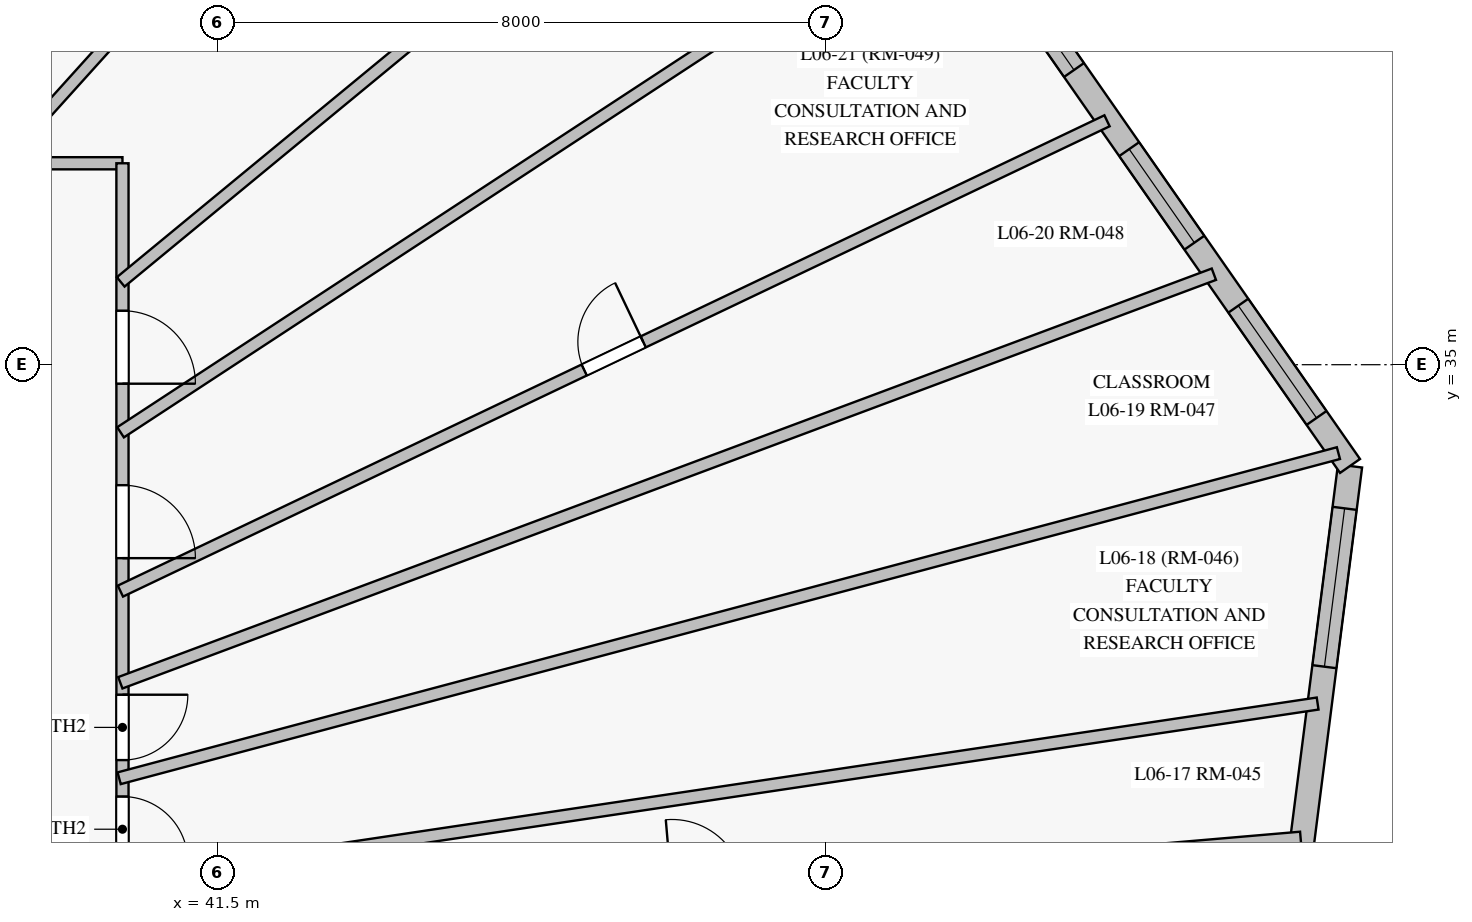
"""IFC4 building model, lengths in metres.
Left out: names, types, materials, properties, quantities, classifications, styles, units other than length and angle.
Written with IfcOpenShell. Run it as: python <this file> out.ifc"""

import sys

from ifc_helpers import new_model, si_unit, direction, frame, frame_2d, origin, origin_with_axes, place, context, subcontext, project, spatial, rectangle, extrude, source, transform, mapped, element, fill, save


model = new_model("IFC4")
c1 = context("Model", 3, precision=1e-05, world=origin(), true_north=direction((0.0, 1.0)))
c2 = subcontext(c1, "Body", "Model", "MODEL_VIEW")
j1 = project(units=[si_unit("LENGTHUNIT", "METRE"), si_unit("PLANEANGLEUNIT", "RADIAN")], contexts=[c1])
p1 = place(None, origin())
s1 = spatial("IfcSite", under=j1, at=p1, CompositionType="ELEMENT")
p2 = place(p1, origin())
s2 = spatial("IfcBuilding", under=s1, at=p2, CompositionType="ELEMENT")
p3 = place(p2, frame((0.0, 0.0, 26.5)))
s3 = spatial("IfcBuildingStorey", under=s2, at=p3, CompositionType="ELEMENT", Elevation=26.5)
p4 = place(p3, frame((55.03, 22.925, 0.0), z_axis=(0.0, 0.0, 1.0), x_axis=(0.126495485641, 0.991967182982, 0.0)))
e1 = element("IfcWall", 1, at=p4, inside=s3, PredefinedType="SOLIDWALL", context=c2, shape_type="SweptSolid", body=[
    extrude(rectangle(XDim=10.829, YDim=0.32, at=frame_2d((5.415, 0.0))), origin(), (0.0, 0.0, 1.0), 3.35),
])
p5 = place(p4, frame((0.58, 0.0, 0.85)))
e2 = element("IfcOpeningElement", 2, at=p5, cuts=e1, PredefinedType="OPENING", context=c2, shape_type="SweptSolid", body=[
    extrude(rectangle(XDim=1.5, YDim=1.85, at=frame_2d((0.75, 0.925))), frame((0.0, 0.17, 0.0), z_axis=(0.0, -1.0, 0.0), x_axis=(1.0, 0.0, 0.0)), (0.0, 0.0, 1.0), 0.34),
])
p6 = place(p4, frame((3.194, 0.0, 0.85)))
e3 = element("IfcOpeningElement", 3, at=p6, cuts=e1, PredefinedType="OPENING", context=c2, shape_type="SweptSolid", body=[
    extrude(rectangle(XDim=2.1, YDim=1.95, at=frame_2d((1.05, 0.975))), frame((0.0, 0.17, 0.0), z_axis=(0.0, -1.0, 0.0), x_axis=(1.0, 0.0, 0.0)), (0.0, 0.0, 1.0), 0.34),
])
p7 = place(p4, frame((8.167, 0.0, 0.85)))
e4 = element("IfcOpeningElement", 4, at=p7, cuts=e1, PredefinedType="OPENING", context=c2, shape_type="SweptSolid", body=[
    extrude(rectangle(XDim=2.1, YDim=1.95, at=frame_2d((1.05, 0.975))), frame((0.0, 0.17, 0.0), z_axis=(0.0, -1.0, 0.0), x_axis=(1.0, 0.0, 0.0)), (0.0, 0.0, 1.0), 0.34),
])
p8 = place(p3, frame((56.4, 33.668, 0.0), z_axis=(0.0, 0.0, 1.0), x_axis=(-0.571842194633, 0.820363641586, 0.0)))
e5 = element("IfcWall", 5, at=p8, inside=s3, PredefinedType="SOLIDWALL", context=c2, shape_type="SweptSolid", body=[
    extrude(rectangle(XDim=13.47, YDim=0.32, at=frame_2d((6.735, 0.0))), origin(), (0.0, 0.0, 1.0), 3.35),
])
p9 = place(p8, frame((0.77, 0.0, 0.85)))
e6 = element("IfcOpeningElement", 6, at=p9, cuts=e5, PredefinedType="OPENING", context=c2, shape_type="SweptSolid", body=[
    extrude(rectangle(XDim=1.8, YDim=1.85, at=frame_2d((0.9, 0.925))), frame((0.0, 0.17, 0.0), z_axis=(0.0, -1.0, 0.0), x_axis=(1.0, 0.0, 0.0)), (0.0, 0.0, 1.0), 0.34),
])
p10 = place(p8, frame((3.581, 0.0, 0.85)))
e7 = element("IfcOpeningElement", 7, at=p10, cuts=e5, PredefinedType="OPENING", context=c2, shape_type="SweptSolid", body=[
    extrude(rectangle(XDim=1.5, YDim=1.85, at=frame_2d((0.75, 0.925))), frame((0.0, 0.17, 0.0), z_axis=(0.0, -1.0, 0.0), x_axis=(1.0, 0.0, 0.0)), (0.0, 0.0, 1.0), 0.34),
])
p11 = place(p8, frame((6.35, 0.0, 0.85)))
e8 = element("IfcOpeningElement", 8, at=p11, cuts=e5, PredefinedType="OPENING", context=c2, shape_type="SweptSolid", body=[
    extrude(rectangle(XDim=2.1, YDim=1.95, at=frame_2d((1.05, 0.975))), frame((0.0, 0.17, 0.0), z_axis=(0.0, -1.0, 0.0), x_axis=(1.0, 0.0, 0.0)), (0.0, 0.0, 1.0), 0.34),
])
p12 = place(p8, frame((9.816, 0.0, 0.85)))
e9 = element("IfcOpeningElement", 9, at=p12, cuts=e5, PredefinedType="OPENING", context=c2, shape_type="SweptSolid", body=[
    extrude(rectangle(XDim=1.8, YDim=1.85, at=frame_2d((0.9, 0.925))), frame((0.0, 0.17, 0.0), z_axis=(0.0, -1.0, 0.0), x_axis=(1.0, 0.0, 0.0)), (0.0, 0.0, 1.0), 0.34),
])
p13 = place(p3, frame((10.5, 37.65, 0.0), z_axis=(0.0, 0.0, 1.0), x_axis=(1.0, 0.0, 0.0)))
e10 = element("IfcWall", 10, at=p13, inside=s3, PredefinedType="PARTITIONING", context=c2, shape_type="SweptSolid", body=[
    extrude(rectangle(XDim=29.75, YDim=0.16, at=frame_2d((14.875, 0.0))), origin(), (0.0, 0.0, 1.0), 2.75),
])
p14 = place(p13, frame((26.906, 0.0, 0.0)))
e11 = element("IfcOpeningElement", 11, at=p14, cuts=e10, PredefinedType="OPENING", context=c2, shape_type="SweptSolid", body=[
    extrude(rectangle(XDim=0.95, YDim=2.15, at=frame_2d((0.475, 1.075))), frame((0.0, 0.09, 0.0), z_axis=(0.0, -1.0, 0.0), x_axis=(1.0, 0.0, 0.0)), (0.0, 0.0, 1.0), 0.18),
])
p15 = place(p13, frame((24.377, 0.0, 0.0)))
e12 = element("IfcOpeningElement", 12, at=p15, cuts=e10, PredefinedType="OPENING", context=c2, shape_type="SweptSolid", body=[
    extrude(rectangle(XDim=0.95, YDim=2.15, at=frame_2d((0.475, 1.075))), frame((0.0, 0.09, 0.0), z_axis=(0.0, -1.0, 0.0), x_axis=(1.0, 0.0, 0.0)), (0.0, 0.0, 1.0), 0.18),
])
p16 = place(p13, frame((21.812, 0.0, 0.0)))
e13 = element("IfcOpeningElement", 13, at=p16, cuts=e10, PredefinedType="OPENING", context=c2, shape_type="SweptSolid", body=[
    extrude(rectangle(XDim=0.96, YDim=2.15, at=frame_2d((0.48, 1.075))), frame((0.0, 0.09, 0.0), z_axis=(0.0, -1.0, 0.0), x_axis=(1.0, 0.0, 0.0)), (0.0, 0.0, 1.0), 0.18),
])
p17 = place(p13, frame((19.548, 0.0, 0.0)))
e14 = element("IfcOpeningElement", 14, at=p17, cuts=e10, PredefinedType="OPENING", context=c2, shape_type="SweptSolid", body=[
    extrude(rectangle(XDim=0.95, YDim=2.15, at=frame_2d((0.475, 1.075))), frame((0.0, 0.09, 0.0), z_axis=(0.0, -1.0, 0.0), x_axis=(1.0, 0.0, 0.0)), (0.0, 0.0, 1.0), 0.18),
])
p18 = place(p13, frame((17.272, 0.0, 0.0)))
e15 = element("IfcOpeningElement", 15, at=p18, cuts=e10, PredefinedType="OPENING", context=c2, shape_type="SweptSolid", body=[
    extrude(rectangle(XDim=0.95, YDim=2.15, at=frame_2d((0.475, 1.075))), frame((0.0, 0.09, 0.0), z_axis=(0.0, -1.0, 0.0), x_axis=(1.0, 0.0, 0.0)), (0.0, 0.0, 1.0), 0.18),
])
p19 = place(p13, frame((15.625, 0.0, 0.0)))
e16 = element("IfcOpeningElement", 16, at=p19, cuts=e10, PredefinedType="OPENING", context=c2, shape_type="SweptSolid", body=[
    extrude(rectangle(XDim=0.96, YDim=2.15, at=frame_2d((0.48, 1.075))), frame((0.0, 0.09, 0.0), z_axis=(0.0, -1.0, 0.0), x_axis=(1.0, 0.0, 0.0)), (0.0, 0.0, 1.0), 0.18),
])
p20 = place(p13, frame((14.4, 0.0, 0.0)))
e17 = element("IfcOpeningElement", 17, at=p20, cuts=e10, PredefinedType="OPENING", context=c2, shape_type="SweptSolid", body=[
    extrude(rectangle(XDim=0.95, YDim=2.15, at=frame_2d((0.475, 1.075))), frame((0.0, 0.09, 0.0), z_axis=(0.0, -1.0, 0.0), x_axis=(1.0, 0.0, 0.0)), (0.0, 0.0, 1.0), 0.18),
])
p21 = place(p13, frame((9.938, 0.0, 0.0)))
e18 = element("IfcOpeningElement", 18, at=p21, cuts=e10, PredefinedType="OPENING", context=c2, shape_type="SweptSolid", body=[
    extrude(rectangle(XDim=0.95, YDim=2.15, at=frame_2d((0.475, 1.075))), frame((0.0, 0.09, 0.0), z_axis=(0.0, -1.0, 0.0), x_axis=(1.0, 0.0, 0.0)), (0.0, 0.0, 1.0), 0.18),
])
p22 = place(p3, frame((40.25, 37.65, 0.0), z_axis=(0.0, 0.0, 1.0), x_axis=(0.0, -1.0, 0.0)))
e19 = element("IfcWall", 19, at=p22, inside=s3, PredefinedType="PARTITIONING", context=c2, shape_type="SweptSolid", body=[
    extrude(rectangle(XDim=22.3, YDim=0.16, at=frame_2d((11.15, 0.0))), origin(), (0.0, 0.0, 1.0), 2.75),
])
p23 = place(p22, frame((16.25, 0.0, 0.0)))
e20 = element("IfcOpeningElement", 20, at=p23, cuts=e19, PredefinedType="OPENING", context=c2, shape_type="SweptSolid", body=[
    extrude(rectangle(XDim=0.96, YDim=2.15, at=frame_2d((0.48, 1.075))), frame((0.0, 0.09, 0.0), z_axis=(0.0, -1.0, 0.0), x_axis=(1.0, 0.0, 0.0)), (0.0, 0.0, 1.0), 0.18),
])
p24 = place(p22, frame((14.02, 0.0, 0.0)))
e21 = element("IfcOpeningElement", 21, at=p24, cuts=e19, PredefinedType="OPENING", context=c2, shape_type="SweptSolid", body=[
    extrude(rectangle(XDim=0.95, YDim=2.15, at=frame_2d((0.475, 1.075))), frame((0.0, 0.09, 0.0), z_axis=(0.0, -1.0, 0.0), x_axis=(1.0, 0.0, 0.0)), (0.0, 0.0, 1.0), 0.18),
])
p25 = place(p22, frame((12.052, 0.0, 0.0)))
e22 = element("IfcOpeningElement", 22, at=p25, cuts=e19, PredefinedType="OPENING", context=c2, shape_type="SweptSolid", body=[
    extrude(rectangle(XDim=0.95, YDim=2.15, at=frame_2d((0.475, 1.075))), frame((0.0, 0.09, 0.0), z_axis=(0.0, -1.0, 0.0), x_axis=(1.0, 0.0, 0.0)), (0.0, 0.0, 1.0), 0.18),
])
p26 = place(p22, frame((4.235, 0.0, 0.0)))
e23 = element("IfcOpeningElement", 23, at=p26, cuts=e19, PredefinedType="OPENING", context=c2, shape_type="SweptSolid", body=[
    extrude(rectangle(XDim=0.96, YDim=2.15, at=frame_2d((0.48, 1.075))), frame((0.0, 0.09, 0.0), z_axis=(0.0, -1.0, 0.0), x_axis=(1.0, 0.0, 0.0)), (0.0, 0.0, 1.0), 0.18),
])
p27 = place(p22, frame((10.45, 0.0, 0.0)))
e24 = element("IfcOpeningElement", 24, at=p27, cuts=e19, PredefinedType="OPENING", context=c2, shape_type="SweptSolid", body=[
    extrude(rectangle(XDim=0.86, YDim=2.1, at=frame_2d((0.43, 1.05))), frame((0.0, 0.09, 0.0), z_axis=(0.0, -1.0, 0.0), x_axis=(1.0, 0.0, 0.0)), (0.0, 0.0, 1.0), 0.18),
])
p28 = place(p22, frame((1.94, 0.0, 0.0)))
e25 = element("IfcOpeningElement", 25, at=p28, cuts=e19, PredefinedType="OPENING", context=c2, shape_type="SweptSolid", body=[
    extrude(rectangle(XDim=0.96, YDim=2.15, at=frame_2d((0.48, 1.075))), frame((0.0, 0.09, 0.0), z_axis=(0.0, -1.0, 0.0), x_axis=(1.0, 0.0, 0.0)), (0.0, 0.0, 1.0), 0.18),
])
p29 = place(p22, frame((17.39, 0.0, 0.0)))
e26 = element("IfcOpeningElement", 26, at=p29, cuts=e19, PredefinedType="OPENING", context=c2, shape_type="SweptSolid", body=[
    extrude(rectangle(XDim=0.95, YDim=2.15, at=frame_2d((0.475, 1.075))), frame((0.0, 0.09, 0.0), z_axis=(0.0, -1.0, 0.0), x_axis=(1.0, 0.0, 0.0)), (0.0, 0.0, 1.0), 0.18),
])
p30 = place(p22, frame((18.522, 0.0, 0.0)))
e27 = element("IfcOpeningElement", 27, at=p30, cuts=e19, PredefinedType="OPENING", context=c2, shape_type="SweptSolid", body=[
    extrude(rectangle(XDim=0.95, YDim=2.15, at=frame_2d((0.475, 1.075))), frame((0.0, 0.09, 0.0), z_axis=(0.0, -1.0, 0.0), x_axis=(1.0, 0.0, 0.0)), (0.0, 0.0, 1.0), 0.18),
])
p31 = place(p22, frame((8.331, 0.0, 0.0)))
e28 = element("IfcOpeningElement", 28, at=p31, cuts=e19, PredefinedType="OPENING", context=c2, shape_type="SweptSolid", body=[
    extrude(rectangle(XDim=0.86, YDim=2.04, at=frame_2d((0.43, 1.02))), frame((0.0, 0.09, 0.0), z_axis=(0.0, -1.0, 0.0), x_axis=(1.0, 0.0, 0.0)), (0.0, 0.0, 1.0), 0.18),
])
p32 = place(p22, frame((6.992, 0.0, 0.0)))
e29 = element("IfcOpeningElement", 29, at=p32, cuts=e19, PredefinedType="OPENING", context=c2, shape_type="SweptSolid", body=[
    extrude(rectangle(XDim=0.86, YDim=2.04, at=frame_2d((0.43, 1.02))), frame((0.0, 0.09, 0.0), z_axis=(0.0, -1.0, 0.0), x_axis=(1.0, 0.0, 0.0)), (0.0, 0.0, 1.0), 0.18),
])
p33 = place(p3, frame((40.207, 29.559, 0.0), z_axis=(0.0, 0.0, 1.0), x_axis=(0.966241529616, 0.257637936736, 0.0)))
e30 = element("IfcWall", 30, at=p33, inside=s3, PredefinedType="PARTITIONING", context=c2, shape_type="SweptSolid", body=[
    extrude(rectangle(XDim=16.601, YDim=0.16, at=frame_2d((8.301, 0.0))), origin(), (0.0, 0.0, 1.0), 3.35),
])
p34 = place(p3, frame((40.22, 28.189, 0.0), z_axis=(0.0, 0.0, 1.0), x_axis=(0.989032606849, 0.147697334402, 0.0)))
e31 = element("IfcWall", 31, at=p34, inside=s3, PredefinedType="PARTITIONING", context=c2, shape_type="SweptSolid", body=[
    extrude(rectangle(XDim=15.928, YDim=0.16, at=frame_2d((7.964, 0.0))), origin(), (0.0, 0.0, 1.0), 3.35),
])
p35 = place(p3, frame((40.205, 27.443, 0.0), z_axis=(0.0, 0.0, 1.0), x_axis=(0.996343224328, 0.08544108693, 0.0)))
e32 = element("IfcWall", 32, at=p35, inside=s3, PredefinedType="PARTITIONING", context=c2, shape_type="SweptSolid", body=[
    extrude(rectangle(XDim=15.602, YDim=0.16, at=frame_2d((7.801, 0.0))), origin(), (0.0, 0.0, 1.0), 3.35),
])
p36 = place(p35, frame((7.301, 0.0, 0.0)))
e33 = element("IfcOpeningElement", 33, at=p36, cuts=e32, PredefinedType="OPENING", context=c2, shape_type="SweptSolid", body=[
    extrude(rectangle(XDim=0.95, YDim=2.15, at=frame_2d((0.475, 1.075))), frame((0.0, 0.09, 0.0), z_axis=(0.0, -1.0, 0.0), x_axis=(1.0, 0.0, 0.0)), (0.0, 0.0, 1.0), 0.18),
])
p37 = place(p3, frame((40.222, 30.815, 0.0), z_axis=(0.0, 0.0, 1.0), x_axis=(0.936757036067, 0.349980364276, 0.0)))
e34 = element("IfcWall", 34, at=p37, inside=s3, PredefinedType="PARTITIONING", context=c2, shape_type="SweptSolid", body=[
    extrude(rectangle(XDim=15.358, YDim=0.16, at=frame_2d((7.679, 0.0))), origin(), (0.0, 0.0, 1.0), 3.35),
])
p38 = place(p3, frame((40.223, 32.021, 0.0), z_axis=(0.0, 0.0, 1.0), x_axis=(0.902690033132, 0.430291417629, 0.0)))
e35 = element("IfcWall", 35, at=p38, inside=s3, PredefinedType="PARTITIONING", context=c2, shape_type="SweptSolid", body=[
    extrude(rectangle(XDim=14.379, YDim=0.16, at=frame_2d((7.189, 0.0))), origin(), (0.0, 0.0, 1.0), 3.35),
])
p39 = place(p38, frame((6.76, 0.0, 0.0)))
e36 = element("IfcOpeningElement", 36, at=p39, cuts=e35, PredefinedType="OPENING", context=c2, shape_type="SweptSolid", body=[
    extrude(rectangle(XDim=0.86, YDim=2.04, at=frame_2d((0.43, 1.02))), frame((0.0, 0.09, 0.0), z_axis=(0.0, -1.0, 0.0), x_axis=(1.0, 0.0, 0.0)), (0.0, 0.0, 1.0), 0.18),
])
p40 = place(p3, frame((40.225, 34.111, 0.0), z_axis=(0.0, 0.0, 1.0), x_axis=(0.836442719116, 0.548054356463, 0.0)))
e37 = element("IfcWall", 37, at=p40, inside=s3, PredefinedType="PARTITIONING", context=c2, shape_type="SweptSolid", body=[
    extrude(rectangle(XDim=12.997, YDim=0.16, at=frame_2d((6.498, 0.0))), origin(), (0.0, 0.0, 1.0), 3.35),
])
p41 = place(p3, frame((36.062, 37.625, 0.0), z_axis=(0.0, 0.0, 1.0), x_axis=(0.558468232685, 0.829525908626, 0.0)))
e38 = element("IfcWall", 38, at=p41, inside=s3, PredefinedType="PARTITIONING", context=c2, shape_type="SweptSolid", body=[
    extrude(rectangle(XDim=11.958, YDim=0.16, at=frame_2d((5.979, 0.0))), origin(), (0.0, 0.0, 1.0), 3.35),
])
p42 = place(p3, frame((38.611, 37.617, 0.0), z_axis=(0.0, 0.0, 1.0), x_axis=(0.669895621774, 0.742455288841, 0.0)))
e39 = element("IfcWall", 39, at=p42, inside=s3, PredefinedType="PARTITIONING", context=c2, shape_type="SweptSolid", body=[
    extrude(rectangle(XDim=11.194, YDim=0.16, at=frame_2d((5.597, 0.0))), origin(), (0.0, 0.0, 1.0), 3.35),
])
p43 = place(p42, frame((5.167, 0.0, 0.0)))
e40 = element("IfcOpeningElement", 40, at=p43, cuts=e39, PredefinedType="OPENING", context=c2, shape_type="SweptSolid", body=[
    extrude(rectangle(XDim=0.86, YDim=2.04, at=frame_2d((0.43, 1.02))), frame((0.0, 0.09, 0.0), z_axis=(0.0, -1.0, 0.0), x_axis=(1.0, 0.0, 0.0)), (0.0, 0.0, 1.0), 0.18),
])
p44 = place(p3, frame((40.227, 36.089, 0.0), z_axis=(0.0, 0.0, 1.0), x_axis=(0.771628936431, 0.636072939577, 0.0)))
e41 = element("IfcWall", 41, at=p44, inside=s3, PredefinedType="PARTITIONING", context=c2, shape_type="SweptSolid", body=[
    extrude(rectangle(XDim=7.534, YDim=0.16, at=frame_2d((3.767, 0.0))), origin(), (0.0, 0.0, 1.0), 2.7),
])
m1 = source(origin_with_axes(), c2, "Body", "SweptSolid", [
    extrude(rectangle(XDim=2.1, YDim=1.95, at=frame_2d((1.05, 0.975))), frame((0.0, 0.03, 0.0), z_axis=(0.0, -1.0, 0.0), x_axis=(1.0, 0.0, 0.0)), (0.0, 0.0, 1.0), 0.06),
])
p45 = place(p7, origin())
e42 = element("IfcWindow", 42, at=p45, inside=s3, PartitioningType="SINGLE_PANEL", PredefinedType="WINDOW", context=c2, shape_type="MappedRepresentation", body=[
    mapped(m1, transform((0.0, 0.0, 0.0), scale=1.0)),
])
fill(e4, e42)
m2 = source(origin_with_axes(), c2, "Body", "SweptSolid", [
    extrude(rectangle(XDim=1.8, YDim=1.85, at=frame_2d((0.9, 0.925))), frame((0.0, 0.03, 0.0), z_axis=(0.0, -1.0, 0.0), x_axis=(1.0, 0.0, 0.0)), (0.0, 0.0, 1.0), 0.06),
])
p46 = place(p9, origin())
e43 = element("IfcWindow", 43, at=p46, inside=s3, PartitioningType="SINGLE_PANEL", PredefinedType="WINDOW", context=c2, shape_type="MappedRepresentation", body=[
    mapped(m2, transform((0.0, 0.0, 0.0), scale=1.0)),
])
fill(e6, e43)
m3 = source(origin_with_axes(), c2, "Body", "SweptSolid", [
    extrude(rectangle(XDim=1.5, YDim=1.85, at=frame_2d((0.75, 0.925))), frame((0.0, 0.03, 0.0), z_axis=(0.0, -1.0, 0.0), x_axis=(1.0, 0.0, 0.0)), (0.0, 0.0, 1.0), 0.06),
])
p47 = place(p10, origin())
e44 = element("IfcWindow", 44, at=p47, inside=s3, PartitioningType="SINGLE_PANEL", PredefinedType="WINDOW", context=c2, shape_type="MappedRepresentation", body=[
    mapped(m3, transform((0.0, 0.0, 0.0), scale=1.0)),
])
fill(e7, e44)
p48 = place(p11, origin())
e45 = element("IfcWindow", 45, at=p48, inside=s3, PartitioningType="SINGLE_PANEL", PredefinedType="WINDOW", context=c2, shape_type="MappedRepresentation", body=[
    mapped(m1, transform((0.0, 0.0, 0.0), scale=1.0)),
])
fill(e8, e45)
m4 = source(origin_with_axes(), c2, "Body", "SweptSolid", [
    extrude(rectangle(XDim=0.96, YDim=2.15, at=frame_2d((0.48, 1.075))), frame((0.0, 0.025, 0.0), z_axis=(0.0, -1.0, 0.0), x_axis=(1.0, 0.0, 0.0)), (0.0, 0.0, 1.0), 0.05),
])
p49 = place(p26, origin())
e46 = element("IfcDoor", 46, at=p49, inside=s3, OperationType="SINGLE_SWING_RIGHT", PredefinedType="DOOR", context=c2, shape_type="MappedRepresentation", body=[
    mapped(m4, transform((0.0, 0.0, 0.0), scale=1.0)),
])
fill(e23, e46)
p50 = place(p28, origin())
e47 = element("IfcDoor", 47, at=p50, inside=s3, OperationType="SINGLE_SWING_RIGHT", PredefinedType="DOOR", context=c2, shape_type="MappedRepresentation", body=[
    mapped(m4, transform((0.0, 0.0, 0.0), scale=1.0)),
])
fill(e25, e47)
m5 = source(origin_with_axes(), c2, "Body", "SweptSolid", [
    extrude(rectangle(XDim=0.86, YDim=2.04, at=frame_2d((0.43, 1.02))), frame((0.0, 0.025, 0.0), z_axis=(0.0, -1.0, 0.0), x_axis=(1.0, 0.0, 0.0)), (0.0, 0.0, 1.0), 0.05),
])
p51 = place(p31, origin())
e48 = element("IfcDoor", 48, at=p51, inside=s3, OperationType="SINGLE_SWING_RIGHT", PredefinedType="DOOR", context=c2, shape_type="MappedRepresentation", body=[
    mapped(m5, transform((0.0, 0.0, 0.0), scale=1.0)),
])
fill(e28, e48)
p52 = place(p32, origin())
e49 = element("IfcDoor", 49, at=p52, inside=s3, OperationType="SINGLE_SWING_LEFT", PredefinedType="DOOR", context=c2, shape_type="MappedRepresentation", body=[
    mapped(m5, transform((0.0, 0.0, 0.0), scale=1.0)),
])
fill(e29, e49)
p53 = place(p39, origin())
e50 = element("IfcDoor", 50, at=p53, inside=s3, OperationType="SINGLE_SWING_RIGHT", PredefinedType="DOOR", context=c2, shape_type="MappedRepresentation", body=[
    mapped(m5, transform((0.0, 0.0, 0.0), scale=1.0)),
])
fill(e36, e50)
save(model, sys.argv[1])
